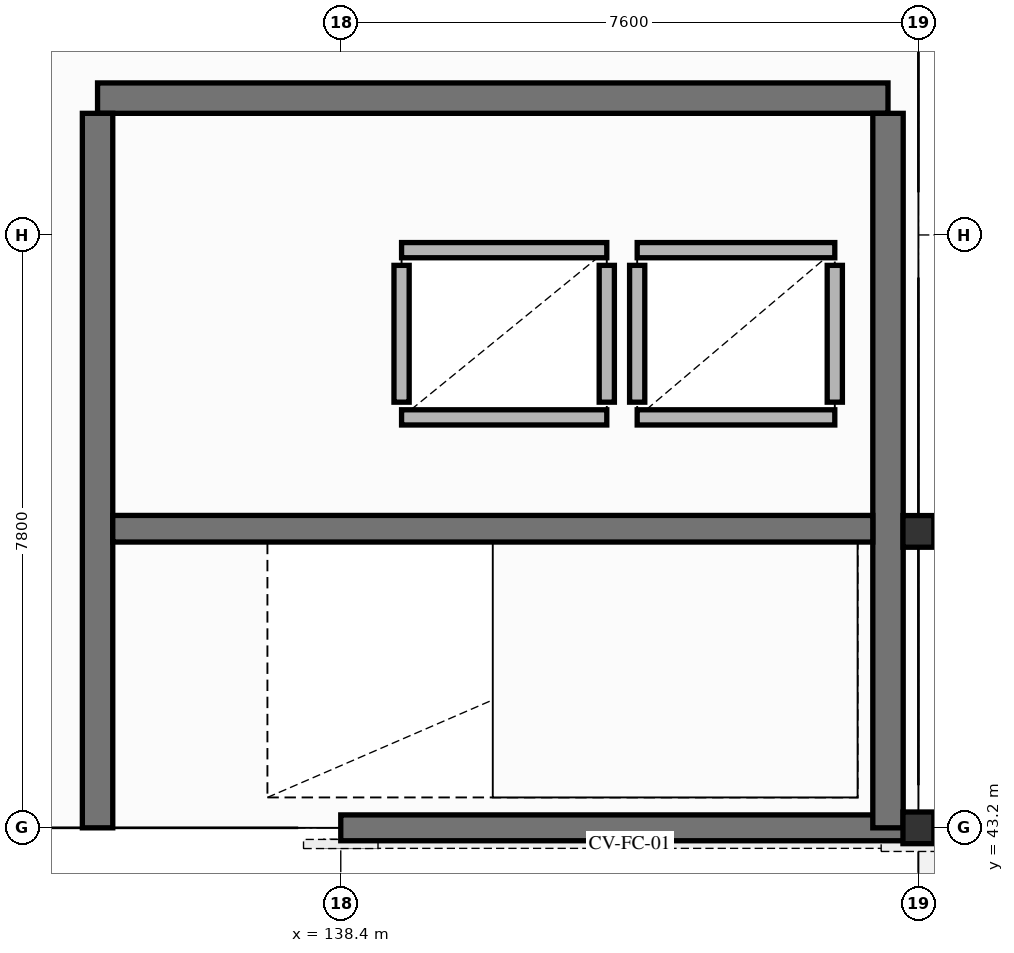
"""IFC4 building model, lengths in metres.
Left out: names, types, materials, properties, quantities, classifications, styles, units other than length and angle.
Written with IfcOpenShell. Run it as: python <this file> out.ifc"""

import sys

from ifc_helpers import new_model, si_unit, direction, frame, frame_2d, origin, origin_2d, place, context, subcontext, project, spatial, rectangle, i_section, extrude, element, fill, save


model = new_model("IFC4")
c1 = context("Model", 3, precision=1e-05, world=origin(), true_north=direction((0.0, 1.0)))
c2 = subcontext(c1, "Body", "Model", "MODEL_VIEW")
j1 = project(units=[si_unit("LENGTHUNIT", "METRE"), si_unit("PLANEANGLEUNIT", "RADIAN")], contexts=[c1])
p1 = place(None, origin())
s1 = spatial("IfcSite", under=j1, at=p1, CompositionType="ELEMENT")
p2 = place(p1, origin())
s2 = spatial("IfcBuilding", under=s1, at=p2, CompositionType="ELEMENT")
p3 = place(p2, frame((0.0, 0.0, 5.1)))
s3 = spatial("IfcBuildingStorey", under=s2, at=p3, CompositionType="ELEMENT", Elevation=5.1)
for number, where, z_axis, x_axis in (
    (1, (146.0, 47.1, 0.0), (0.0, 0.0, 1.0), (1.0, 0.0, 0.0)),
    (2, (146.0, 43.2, 0.0), (0.0, 0.0, 1.0), (1.0, 0.0, 0.0)),
):
    element("IfcColumn", number, at=place(p3, frame(where, z_axis=z_axis, x_axis=x_axis)), inside=s3, PredefinedType="COLUMN", context=c2, shape_type="SweptSolid", body=[
        extrude(i_section(OverallWidth=0.406, OverallDepth=0.417, WebThickness=0.03, FlangeThickness=0.048, at=origin_2d()), origin(), (0.0, 0.0, 1.0), 3.84),
    ])
p4 = place(p3, frame((138.4, 43.2, 0.0), z_axis=(0.0, 0.0, 1.0), x_axis=(1.0, 0.0, 0.0)))
e3 = element("IfcWall", 3, at=p4, inside=s3, PredefinedType="SOLIDWALL", context=c2, shape_type="SweptSolid", body=[
    extrude(rectangle(XDim=7.6, YDim=0.34, at=frame_2d((3.8, 0.0))), origin(), (0.0, 0.0, 1.0), 3.55),
])
p5 = place(p4, frame((2.5, 0.0, 0.9)))
e4 = element("IfcOpeningElement", 4, at=p5, cuts=e3, PredefinedType="OPENING", context=c2, shape_type="SweptSolid", body=[
    extrude(rectangle(XDim=1.5, YDim=2.1, at=frame_2d((0.75, 1.05))), frame((0.0, 0.18, 0.0), z_axis=(0.0, -1.0, 0.0), x_axis=(1.0, 0.0, 0.0)), (0.0, 0.0, 1.0), 0.36),
])
p6 = place(p3, frame((135.2, 52.8, 0.0), z_axis=(0.0, 0.0, 1.0), x_axis=(1.0, 0.0, 0.0)))
e5 = element("IfcWall", 5, at=p6, inside=s3, PredefinedType="SHEAR", context=c2, shape_type="SweptSolid", body=[
    extrude(rectangle(XDim=10.4, YDim=0.4, at=frame_2d((5.2, 0.0))), origin(), (0.0, 0.0, 1.0), 3.55),
])
p7 = place(p6, frame((1.2, 0.0, 0.0)))
e6 = element("IfcOpeningElement", 6, at=p7, cuts=e5, PredefinedType="OPENING", context=c2, shape_type="SweptSolid", body=[
    extrude(rectangle(XDim=1.5, YDim=2.2, at=frame_2d((0.75, 1.1))), frame((0.0, 0.21, 0.0), z_axis=(0.0, -1.0, 0.0), x_axis=(1.0, 0.0, 0.0)), (0.0, 0.0, 1.0), 0.42),
])
for number, where, z_axis, x_axis in (
    (7, (135.2, 43.2, 0.0), (0.0, 0.0, 1.0), (0.0, 1.0, 0.0)),
    (8, (145.6, 43.2, 0.0), (0.0, 0.0, 1.0), (0.0, 1.0, 0.0)),
):
    element("IfcWall", number, at=place(p3, frame(where, z_axis=z_axis, x_axis=x_axis)), inside=s3, PredefinedType="SHEAR", context=c2, shape_type="SweptSolid", body=[
        extrude(rectangle(XDim=9.4, YDim=0.4, at=frame_2d((4.7, 0.0))), origin(), (0.0, 0.0, 1.0), 3.55),
    ])
p8 = place(p3, frame((135.4, 47.135, 0.0), z_axis=(0.0, 0.0, 1.0), x_axis=(1.0, 0.0, 0.0)))
e9 = element("IfcWall", 9, at=p8, inside=s3, PredefinedType="SHEAR", context=c2, shape_type="SweptSolid", body=[
    extrude(rectangle(XDim=10.0, YDim=0.35, at=frame_2d((5.0, 0.0))), origin(), (0.0, 0.0, 1.0), 3.55),
])
p9 = place(p8, frame((0.45, 0.0, 0.0)))
e10 = element("IfcOpeningElement", 10, at=p9, cuts=e9, PredefinedType="OPENING", context=c2, shape_type="SweptSolid", body=[
    extrude(rectangle(XDim=1.05, YDim=2.2, at=frame_2d((0.525, 1.1))), frame((0.0, 0.185, 0.0), z_axis=(0.0, -1.0, 0.0), x_axis=(1.0, 0.0, 0.0)), (0.0, 0.0, 1.0), 0.37),
])
p10 = place(p3, frame((139.2, 48.6, 0.0), z_axis=(0.0, 0.0, 1.0), x_axis=(1.0, 0.0, 0.0)))
e11 = element("IfcWall", 11, at=p10, inside=s3, PredefinedType="PARTITIONING", context=c2, shape_type="SweptSolid", body=[
    extrude(rectangle(XDim=2.7, YDim=0.2, at=frame_2d((1.35, 0.0))), origin(), (0.0, 0.0, 1.0), 3.55),
])
p11 = place(p3, frame((139.2, 50.8, 0.0), z_axis=(0.0, 0.0, 1.0), x_axis=(1.0, 0.0, 0.0)))
e12 = element("IfcWall", 12, at=p11, inside=s3, PredefinedType="PARTITIONING", context=c2, shape_type="SweptSolid", body=[
    extrude(rectangle(XDim=2.7, YDim=0.2, at=frame_2d((1.35, 0.0))), origin(), (0.0, 0.0, 1.0), 3.55),
])
p12 = place(p11, frame((0.8, 0.0, 0.0)))
e13 = element("IfcOpeningElement", 13, at=p12, cuts=e12, PredefinedType="OPENING", context=c2, shape_type="SweptSolid", body=[
    extrude(rectangle(XDim=1.1, YDim=2.15, at=frame_2d((0.55, 1.075))), frame((0.0, 0.11, 0.0), z_axis=(0.0, -1.0, 0.0), x_axis=(1.0, 0.0, 0.0)), (0.0, 0.0, 1.0), 0.22),
])
for number, where, z_axis, x_axis in (
    (14, (139.2, 48.8, 0.0), (0.0, 0.0, 1.0), (0.0, 1.0, 0.0)),
    (15, (141.9, 48.8, 0.0), (0.0, 0.0, 1.0), (0.0, 1.0, 0.0)),
):
    element("IfcWall", number, at=place(p3, frame(where, z_axis=z_axis, x_axis=x_axis)), inside=s3, PredefinedType="PARTITIONING", context=c2, shape_type="SweptSolid", body=[
        extrude(rectangle(XDim=1.8, YDim=0.2, at=frame_2d((0.9, 0.0))), origin(), (0.0, 0.0, 1.0), 3.55),
    ])
p13 = place(p3, frame((142.3, 48.6, 0.0), z_axis=(0.0, 0.0, 1.0), x_axis=(1.0, 0.0, 0.0)))
e16 = element("IfcWall", 16, at=p13, inside=s3, PredefinedType="PARTITIONING", context=c2, shape_type="SweptSolid", body=[
    extrude(rectangle(XDim=2.6, YDim=0.2, at=frame_2d((1.3, 0.0))), origin(), (0.0, 0.0, 1.0), 3.55),
])
p14 = place(p3, frame((142.3, 50.8, 0.0), z_axis=(0.0, 0.0, 1.0), x_axis=(1.0, 0.0, 0.0)))
e17 = element("IfcWall", 17, at=p14, inside=s3, PredefinedType="PARTITIONING", context=c2, shape_type="SweptSolid", body=[
    extrude(rectangle(XDim=2.6, YDim=0.2, at=frame_2d((1.3, 0.0))), origin(), (0.0, 0.0, 1.0), 3.55),
])
p15 = place(p14, frame((0.85, 0.0, 0.0)))
e18 = element("IfcOpeningElement", 18, at=p15, cuts=e17, PredefinedType="OPENING", context=c2, shape_type="SweptSolid", body=[
    extrude(rectangle(XDim=0.9, YDim=2.1, at=frame_2d((0.45, 1.05))), frame((0.0, 0.11, 0.0), z_axis=(0.0, -1.0, 0.0), x_axis=(1.0, 0.0, 0.0)), (0.0, 0.0, 1.0), 0.22),
])
for number, where, z_axis, x_axis in (
    (19, (142.3, 48.8, 0.0), (0.0, 0.0, 1.0), (0.0, 1.0, 0.0)),
    (20, (144.9, 48.8, 0.0), (0.0, 0.0, 1.0), (0.0, 1.0, 0.0)),
):
    element("IfcWall", number, at=place(p3, frame(where, z_axis=z_axis, x_axis=x_axis)), inside=s3, PredefinedType="PARTITIONING", context=c2, shape_type="SweptSolid", body=[
        extrude(rectangle(XDim=1.8, YDim=0.2, at=frame_2d((0.9, 0.0))), origin(), (0.0, 0.0, 1.0), 3.55),
    ])
p16 = place(p5, origin())
e21 = element("IfcWindow", 21, at=p16, inside=s3, PartitioningType="SINGLE_PANEL", PredefinedType="WINDOW", context=c2, shape_type="SweptSolid", body=[
    extrude(rectangle(XDim=1.5, YDim=2.1, at=frame_2d((0.75, 1.05))), frame((0.0, 0.03, 0.0), z_axis=(0.0, -1.0, 0.0), x_axis=(1.0, 0.0, 0.0)), (0.0, 0.0, 1.0), 0.06),
])
fill(e4, e21)
p17 = place(p7, origin())
e22 = element("IfcDoor", 22, at=p17, inside=s3, OperationType="DOUBLE_DOOR_SINGLE_SWING", PredefinedType="DOOR", context=c2, shape_type="SweptSolid", body=[
    extrude(rectangle(XDim=1.5, YDim=2.2, at=frame_2d((0.75, 1.1))), frame((0.0, 0.025, 0.0), z_axis=(0.0, -1.0, 0.0), x_axis=(1.0, 0.0, 0.0)), (0.0, 0.0, 1.0), 0.05),
])
fill(e6, e22)
p18 = place(p9, origin())
e23 = element("IfcDoor", 23, at=p18, inside=s3, OperationType="SINGLE_SWING_RIGHT", PredefinedType="DOOR", context=c2, shape_type="SweptSolid", body=[
    extrude(rectangle(XDim=1.05, YDim=2.2, at=frame_2d((0.525, 1.1))), frame((0.0, 0.025, 0.0), z_axis=(0.0, -1.0, 0.0), x_axis=(1.0, 0.0, 0.0)), (0.0, 0.0, 1.0), 0.05),
])
fill(e10, e23)
p19 = place(p12, origin())
e24 = element("IfcDoor", 24, at=p19, inside=s3, OperationType="SLIDING_TO_LEFT", PredefinedType="DOOR", context=c2, shape_type="SweptSolid", body=[
    extrude(rectangle(XDim=1.1, YDim=2.15, at=frame_2d((0.55, 1.075))), frame((0.0, 0.025, 0.0), z_axis=(0.0, -1.0, 0.0), x_axis=(1.0, 0.0, 0.0)), (0.0, 0.0, 1.0), 0.05),
])
fill(e13, e24)
p20 = place(p15, origin())
e25 = element("IfcDoor", 25, at=p20, inside=s3, OperationType="SINGLE_SWING_LEFT", PredefinedType="DOOR", context=c2, shape_type="SweptSolid", body=[
    extrude(rectangle(XDim=0.9, YDim=2.1, at=frame_2d((0.45, 1.05))), frame((0.0, 0.025, 0.0), z_axis=(0.0, -1.0, 0.0), x_axis=(1.0, 0.0, 0.0)), (0.0, 0.0, 1.0), 0.05),
])
fill(e18, e25)
save(model, sys.argv[1])
